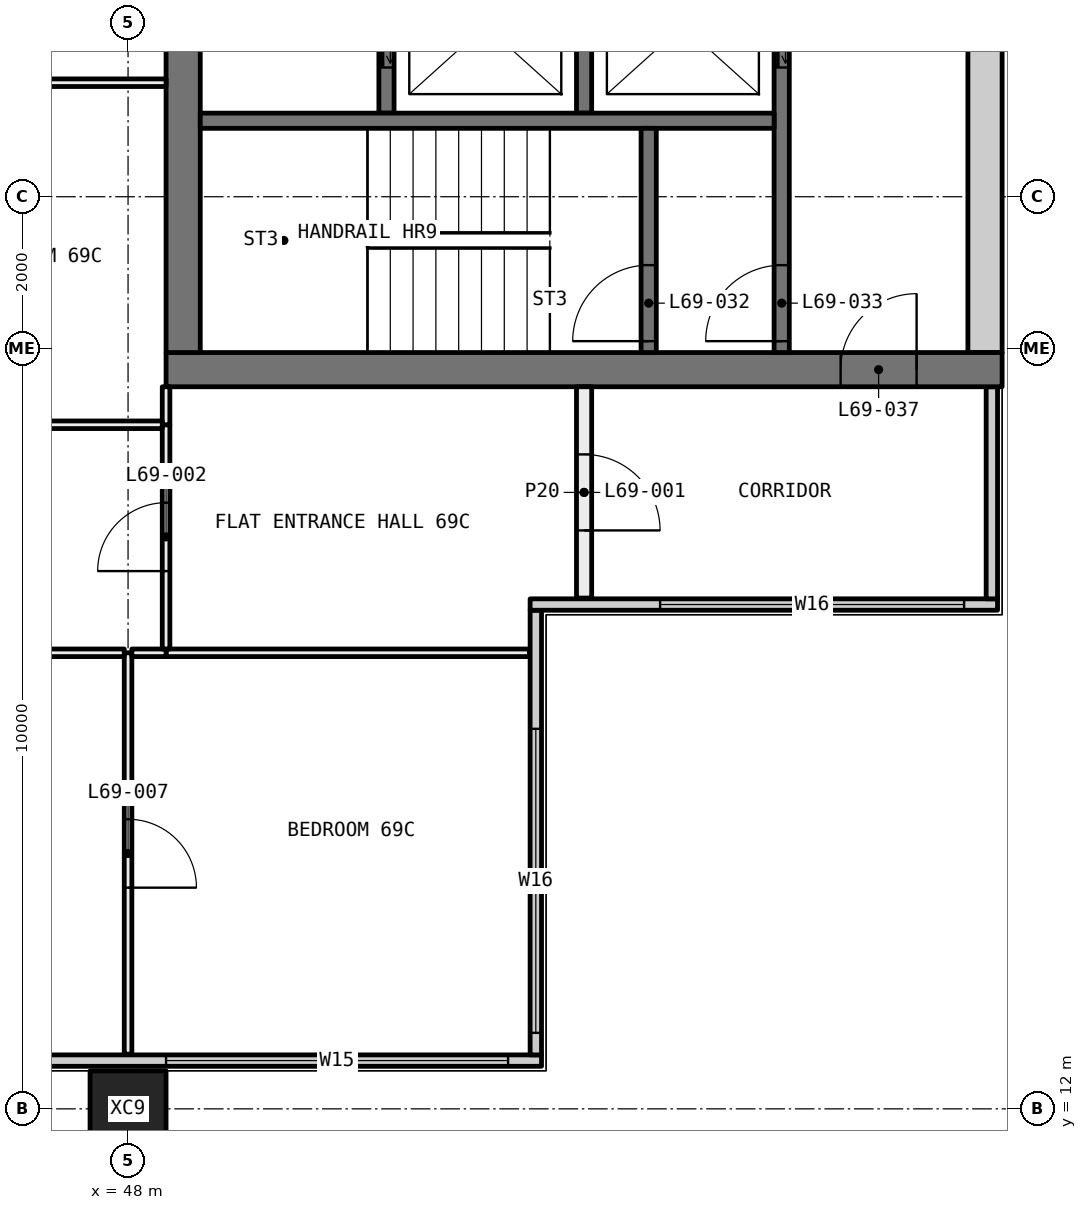
"""IFC4 building model, lengths in metres.
Left out: names, types, materials, properties, quantities, classifications, styles, units other than length and angle.
Written with IfcOpenShell. Run it as: python <this file> out.ifc"""

import sys

from ifc_helpers import new_model, si_unit, direction, frame, frame_2d, origin, origin_2d, place, context, subcontext, project, spatial, rectangle, hollow_rectangle, extrude, element, fill, save


model = new_model("IFC4")
c1 = context("Model", 3, precision=1e-05, world=origin(), true_north=direction((0.0, 1.0)))
c2 = subcontext(c1, "Body", "Model", "MODEL_VIEW")
j1 = project(units=[si_unit("LENGTHUNIT", "METRE"), si_unit("PLANEANGLEUNIT", "RADIAN")], contexts=[c1])
p1 = place(None, origin())
s1 = spatial("IfcSite", under=j1, at=p1, CompositionType="ELEMENT")
p2 = place(p1, origin())
s2 = spatial("IfcBuilding", under=s1, at=p2, CompositionType="ELEMENT")
p3 = place(p2, frame((0.0, 0.0, 255.9)))
s3 = spatial("IfcBuildingStorey", under=s2, at=p3, CompositionType="ELEMENT", Elevation=255.9)
p4 = place(p3, frame((48.0, 12.0, -0.4), z_axis=(0.0, 0.0, 1.0), x_axis=(1.0, 0.0, 0.0)))
e1 = element("IfcColumn", 1, at=p4, inside=s3, PredefinedType="COLUMN", context=c2, shape_type="SweptSolid", body=[
    extrude(hollow_rectangle(XDim=1.0, YDim=1.0, WallThickness=0.036, at=origin_2d()), origin(), (0.0, 0.0, 1.0), 3.45),
])
p5 = place(p3, frame((36.0, 12.635, 0.0), z_axis=(0.0, 0.0, 1.0), x_axis=(1.0, 0.0, 0.0)))
e2 = element("IfcWall", 2, at=p5, inside=s3, PredefinedType="ELEMENTEDWALL", context=c2, shape_type="SweptSolid", body=[
    extrude(rectangle(XDim=17.44, YDim=0.15, at=frame_2d((8.72, 0.0))), origin(), (0.0, 0.0, 1.0), 3.05),
])
p6 = place(p5, frame((1.75, 0.0, 0.45)))
e3 = element("IfcOpeningElement", 3, at=p6, cuts=e2, PredefinedType="OPENING", context=c2, shape_type="SweptSolid", body=[
    extrude(rectangle(XDim=3.75, YDim=2.55, at=frame_2d((1.875, 1.275))), frame((0.0, 0.085, 0.0), z_axis=(0.0, -1.0, 0.0), x_axis=(1.0, 0.0, 0.0)), (0.0, 0.0, 1.0), 0.17),
])
p7 = place(p5, frame((6.5, 0.0, 0.45)))
e4 = element("IfcOpeningElement", 4, at=p7, cuts=e2, PredefinedType="OPENING", context=c2, shape_type="SweptSolid", body=[
    extrude(rectangle(XDim=3.75, YDim=2.55, at=frame_2d((1.875, 1.275))), frame((0.0, 0.085, 0.0), z_axis=(0.0, -1.0, 0.0), x_axis=(1.0, 0.0, 0.0)), (0.0, 0.0, 1.0), 0.17),
])
p8 = place(p5, frame((12.5, 0.0, 0.45)))
e5 = element("IfcOpeningElement", 5, at=p8, cuts=e2, PredefinedType="OPENING", context=c2, shape_type="SweptSolid", body=[
    extrude(rectangle(XDim=4.5, YDim=2.55, at=frame_2d((2.25, 1.275))), frame((0.0, 0.085, 0.0), z_axis=(0.0, -1.0, 0.0), x_axis=(1.0, 0.0, 0.0)), (0.0, 0.0, 1.0), 0.17),
])
p9 = place(p3, frame((53.365, 12.71, 0.0), z_axis=(0.0, 0.0, 1.0), x_axis=(0.0, 1.0, 0.0)))
e6 = element("IfcWall", 6, at=p9, inside=s3, PredefinedType="ELEMENTEDWALL", context=c2, shape_type="SweptSolid", body=[
    extrude(rectangle(XDim=5.85, YDim=0.15, at=frame_2d((2.925, 0.0))), origin(), (0.0, 0.0, 1.0), 3.05),
])
p10 = place(p9, frame((0.29, 0.0, 0.45)))
e7 = element("IfcOpeningElement", 7, at=p10, cuts=e6, PredefinedType="OPENING", context=c2, shape_type="SweptSolid", body=[
    extrude(rectangle(XDim=4.0, YDim=2.55, at=frame_2d((2.0, 1.275))), frame((0.0, 0.085, 0.0), z_axis=(0.0, -1.0, 0.0), x_axis=(1.0, 0.0, 0.0)), (0.0, 0.0, 1.0), 0.17),
])
p11 = place(p3, frame((53.29, 18.635, 0.0), z_axis=(0.0, 0.0, 1.0), x_axis=(1.0, 0.0, 0.0)))
e8 = element("IfcWall", 8, at=p11, inside=s3, PredefinedType="ELEMENTEDWALL", context=c2, shape_type="SweptSolid", body=[
    extrude(rectangle(XDim=6.15, YDim=0.15, at=frame_2d((3.075, 0.0))), origin(), (0.0, 0.0, 1.0), 3.05),
])
p12 = place(p11, frame((1.71, 0.0, 0.45)))
e9 = element("IfcOpeningElement", 9, at=p12, cuts=e8, PredefinedType="OPENING", context=c2, shape_type="SweptSolid", body=[
    extrude(rectangle(XDim=4.0, YDim=2.55, at=frame_2d((2.0, 1.275))), frame((0.0, 0.085, 0.0), z_axis=(0.0, -1.0, 0.0), x_axis=(1.0, 0.0, 0.0)), (0.0, 0.0, 1.0), 0.17),
])
p13 = place(p3, frame((59.365, 18.71, 0.0), z_axis=(0.0, 0.0, 1.0), x_axis=(0.0, 1.0, 0.0)))
e10 = element("IfcWall", 10, at=p13, inside=s3, PredefinedType="ELEMENTEDWALL", context=c2, shape_type="SweptSolid", body=[
    extrude(rectangle(XDim=2.79, YDim=0.15, at=frame_2d((1.395, 0.0))), origin(), (0.0, 0.0, 1.0), 3.05),
])
p14 = place(p3, frame((48.0, 12.72, 0.0), z_axis=(0.0, 0.0, 1.0), x_axis=(0.0, 1.0, 0.0)))
e11 = element("IfcWall", 11, at=p14, inside=s3, PredefinedType="PARTITIONING", context=c2, shape_type="SweptSolid", body=[
    extrude(rectangle(XDim=5.28, YDim=0.1, at=frame_2d((2.64, 0.0))), origin(), (0.0, 0.0, 1.0), 3.05),
])
p15 = place(p14, frame((2.19, 0.0, 0.0)))
e12 = element("IfcOpeningElement", 12, at=p15, cuts=e11, PredefinedType="OPENING", context=c2, shape_type="SweptSolid", body=[
    extrude(rectangle(XDim=0.9, YDim=2.1, at=frame_2d((0.45, 1.05))), frame((0.0, 0.06, 0.0), z_axis=(0.0, -1.0, 0.0), x_axis=(1.0, 0.0, 0.0)), (0.0, 0.0, 1.0), 0.12),
])
p16 = place(p3, frame((47.95, 18.0, 0.0), z_axis=(0.0, 0.0, 1.0), x_axis=(-1.0, 0.0, 0.0)))
e13 = element("IfcWall", 13, at=p16, inside=s3, PredefinedType="PARTITIONING", context=c2, shape_type="SweptSolid", body=[
    extrude(rectangle(XDim=5.875, YDim=0.1, at=frame_2d((2.938, 0.0))), origin(), (0.0, 0.0, 1.0), 3.05),
])
p17 = place(p16, frame((2.488, 0.0, 0.0)))
e14 = element("IfcOpeningElement", 14, at=p17, cuts=e13, PredefinedType="OPENING", context=c2, shape_type="SweptSolid", body=[
    extrude(rectangle(XDim=0.9, YDim=2.1, at=frame_2d((0.45, 1.05))), frame((0.0, 0.06, 0.0), z_axis=(0.0, -1.0, 0.0), x_axis=(1.0, 0.0, 0.0)), (0.0, 0.0, 1.0), 0.12),
])
p18 = place(p3, frame((53.28, 18.0, 0.0), z_axis=(0.0, 0.0, 1.0), x_axis=(-1.0, 0.0, 0.0)))
e15 = element("IfcWall", 15, at=p18, inside=s3, PredefinedType="PARTITIONING", context=c2, shape_type="SweptSolid", body=[
    extrude(rectangle(XDim=4.78, YDim=0.1, at=frame_2d((2.39, 0.0))), origin(), (0.0, 0.0, 1.0), 3.05),
])
p19 = place(p3, frame((48.5, 18.0, 0.0), z_axis=(0.0, 0.0, 1.0), x_axis=(-1.0, 0.0, 0.0)))
e16 = element("IfcWall", 16, at=p19, inside=s3, PredefinedType="PARTITIONING", context=c2, shape_type="SweptSolid", body=[
    extrude(rectangle(XDim=0.45, YDim=0.1, at=frame_2d((0.225, 0.0))), origin(), (0.0, 0.0, 1.0), 3.05),
])
p20 = place(p3, frame((48.5, 21.0, 0.0), z_axis=(0.0, 0.0, 1.0), x_axis=(0.0, -1.0, 0.0)))
e17 = element("IfcWall", 17, at=p20, inside=s3, PredefinedType="PARTITIONING", context=c2, shape_type="SweptSolid", body=[
    extrude(rectangle(XDim=2.95, YDim=0.1, at=frame_2d((1.475, 0.0))), origin(), (0.0, 0.0, 1.0), 3.05),
])
p21 = place(p20, frame((1.025, 0.0, 0.0)))
e18 = element("IfcOpeningElement", 18, at=p21, cuts=e17, PredefinedType="OPENING", context=c2, shape_type="SweptSolid", body=[
    extrude(rectangle(XDim=0.9, YDim=2.1, at=frame_2d((0.45, 1.05))), frame((0.0, 0.06, 0.0), z_axis=(0.0, -1.0, 0.0), x_axis=(1.0, 0.0, 0.0)), (0.0, 0.0, 1.0), 0.12),
])
p22 = place(p3, frame((48.5, 21.5, 0.0), z_axis=(0.0, 0.0, 1.0), x_axis=(0.0, -1.0, 0.0)))
e19 = element("IfcWall", 19, at=p22, inside=s3, PredefinedType="PARTITIONING", context=c2, shape_type="SweptSolid", body=[
    extrude(rectangle(XDim=0.5, YDim=0.1, at=frame_2d((0.25, 0.0))), origin(), (0.0, 0.0, 1.0), 3.05),
])
p23 = place(p3, frame((54.0, 18.72, 0.0), z_axis=(0.0, 0.0, 1.0), x_axis=(0.0, 1.0, 0.0)))
e20 = element("IfcWall", 20, at=p23, inside=s3, PredefinedType="PARTITIONING", context=c2, shape_type="SweptSolid", body=[
    extrude(rectangle(XDim=2.78, YDim=0.2, at=frame_2d((1.39, 0.0))), origin(), (0.0, 0.0, 1.0), 3.05),
])
p24 = place(p23, frame((0.89, 0.0, 0.0)))
e21 = element("IfcOpeningElement", 21, at=p24, cuts=e20, PredefinedType="OPENING", context=c2, shape_type="SweptSolid", body=[
    extrude(rectangle(XDim=1.0, YDim=2.1, at=frame_2d((0.5, 1.05))), frame((0.0, 0.11, 0.0), z_axis=(0.0, -1.0, 0.0), x_axis=(1.0, 0.0, 0.0)), (0.0, 0.0, 1.0), 0.22),
])
p25 = place(p3, frame((48.45, 21.0, 0.0), z_axis=(0.0, 0.0, 1.0), x_axis=(-1.0, 0.0, 0.0)))
e22 = element("IfcWall", 22, at=p25, inside=s3, PredefinedType="PARTITIONING", context=c2, shape_type="SweptSolid", body=[
    extrude(rectangle(XDim=6.4, YDim=0.1, at=frame_2d((3.2, 0.0))), origin(), (0.0, 0.0, 1.0), 3.05),
])
p26 = place(p25, frame((2.75, 0.0, 0.0)))
e23 = element("IfcOpeningElement", 23, at=p26, cuts=e22, PredefinedType="OPENING", context=c2, shape_type="SweptSolid", body=[
    extrude(rectangle(XDim=0.9, YDim=2.1, at=frame_2d((0.45, 1.05))), frame((0.0, 0.06, 0.0), z_axis=(0.0, -1.0, 0.0), x_axis=(1.0, 0.0, 0.0)), (0.0, 0.0, 1.0), 0.12),
])
p27 = place(p3, frame((48.5, 25.5, 0.0), z_axis=(0.0, 0.0, 1.0), x_axis=(-1.0, 0.0, 0.0)))
e24 = element("IfcWall", 24, at=p27, inside=s3, PredefinedType="PARTITIONING", context=c2, shape_type="SweptSolid", body=[
    extrude(rectangle(XDim=6.45, YDim=0.1, at=frame_2d((3.225, 0.0))), origin(), (0.0, 0.0, 1.0), 3.05),
])
p28 = place(p27, frame((2.775, 0.0, 0.0)))
e25 = element("IfcOpeningElement", 25, at=p28, cuts=e24, PredefinedType="OPENING", context=c2, shape_type="SweptSolid", body=[
    extrude(rectangle(XDim=0.9, YDim=2.1, at=frame_2d((0.45, 1.05))), frame((0.0, 0.06, 0.0), z_axis=(0.0, -1.0, 0.0), x_axis=(1.0, 0.0, 0.0)), (0.0, 0.0, 1.0), 0.12),
])
p29 = place(p3, frame((59.5, 21.725, 0.0), z_axis=(0.0, 0.0, 1.0), x_axis=(-1.0, 0.0, 0.0)))
e26 = element("IfcWall", 26, at=p29, inside=s3, PredefinedType="SHEAR", context=c2, shape_type="SweptSolid", body=[
    extrude(rectangle(XDim=11.0, YDim=0.45, at=frame_2d((5.5, 0.0))), origin(), (0.0, 0.0, 1.0), 3.05),
])
p30 = place(p29, frame((1.125, 0.0, 0.0)))
e27 = element("IfcOpeningElement", 27, at=p30, cuts=e26, PredefinedType="OPENING", context=c2, shape_type="SweptSolid", body=[
    extrude(rectangle(XDim=1.0, YDim=2.1, at=frame_2d((0.5, 1.05))), frame((0.0, 0.235, 0.0), z_axis=(0.0, -1.0, 0.0), x_axis=(1.0, 0.0, 0.0)), (0.0, 0.0, 1.0), 0.47),
])
p31 = place(p3, frame((59.275, 21.95, 0.0), z_axis=(0.0, 0.0, 1.0), x_axis=(0.0, 1.0, 0.0)))
e28 = element("IfcWall", 28, at=p31, inside=s3, PredefinedType="SHEAR", context=c2, shape_type="SweptSolid", body=[
    extrude(rectangle(XDim=16.1, YDim=0.45, at=frame_2d((8.05, 0.0))), origin(), (0.0, 0.0, 1.0), 3.05),
])
p32 = place(p3, frame((48.725, 21.95, 0.0), z_axis=(0.0, 0.0, 1.0), x_axis=(0.0, 1.0, 0.0)))
e29 = element("IfcWall", 29, at=p32, inside=s3, PredefinedType="SHEAR", context=c2, shape_type="SweptSolid", body=[
    extrude(rectangle(XDim=16.1, YDim=0.45, at=frame_2d((8.05, 0.0))), origin(), (0.0, 0.0, 1.0), 3.05),
])
p33 = place(p32, frame((7.25, 0.0, 0.0)))
e30 = element("IfcOpeningElement", 30, at=p33, cuts=e29, PredefinedType="OPENING", context=c2, shape_type="SweptSolid", body=[
    extrude(rectangle(XDim=1.6, YDim=2.1, at=frame_2d((0.8, 1.05))), frame((0.0, 0.235, 0.0), z_axis=(0.0, -1.0, 0.0), x_axis=(1.0, 0.0, 0.0)), (0.0, 0.0, 1.0), 0.47),
])
p34 = place(p3, frame((56.6, 21.95, 0.0), z_axis=(0.0, 0.0, 1.0), x_axis=(0.0, 1.0, 0.0)))
e31 = element("IfcWall", 31, at=p34, inside=s3, PredefinedType="SOLIDWALL", context=c2, shape_type="SweptSolid", body=[
    extrude(rectangle(XDim=12.95, YDim=0.2, at=frame_2d((6.475, 0.0))), origin(), (0.0, 0.0, 1.0), 3.05),
])
p35 = place(p34, frame((3.75, 0.0, 0.0)))
e32 = element("IfcOpeningElement", 32, at=p35, cuts=e31, PredefinedType="OPENING", context=c2, shape_type="SweptSolid", body=[
    extrude(rectangle(XDim=1.1, YDim=2.1, at=frame_2d((0.55, 1.05))), frame((0.0, 0.11, 0.0), z_axis=(0.0, -1.0, 0.0), x_axis=(1.0, 0.0, 0.0)), (0.0, 0.0, 1.0), 0.22),
])
p36 = place(p34, frame((0.15, 0.0, 0.0)))
e33 = element("IfcOpeningElement", 33, at=p36, cuts=e31, PredefinedType="OPENING", context=c2, shape_type="SweptSolid", body=[
    extrude(rectangle(XDim=1.0, YDim=2.1, at=frame_2d((0.5, 1.05))), frame((0.0, 0.11, 0.0), z_axis=(0.0, -1.0, 0.0), x_axis=(1.0, 0.0, 0.0)), (0.0, 0.0, 1.0), 0.22),
])
p37 = place(p34, frame((6.113, 0.0, 0.0)))
e34 = element("IfcOpeningElement", 34, at=p37, cuts=e31, PredefinedType="OPENING", context=c2, shape_type="SweptSolid", body=[
    extrude(rectangle(XDim=0.9, YDim=2.1, at=frame_2d((0.45, 1.05))), frame((0.0, 0.11, 0.0), z_axis=(0.0, -1.0, 0.0), x_axis=(1.0, 0.0, 0.0)), (0.0, 0.0, 1.0), 0.22),
])
p38 = place(p34, frame((9.762, 0.0, 0.0)))
e35 = element("IfcOpeningElement", 35, at=p38, cuts=e31, PredefinedType="OPENING", context=c2, shape_type="SweptSolid", body=[
    extrude(rectangle(XDim=0.9, YDim=2.1, at=frame_2d((0.45, 1.05))), frame((0.0, 0.11, 0.0), z_axis=(0.0, -1.0, 0.0), x_axis=(1.0, 0.0, 0.0)), (0.0, 0.0, 1.0), 0.22),
])
p39 = place(p3, frame((51.4, 25.1, 0.0), z_axis=(0.0, 0.0, 1.0), x_axis=(0.0, 1.0, 0.0)))
e36 = element("IfcWall", 36, at=p39, inside=s3, PredefinedType="SOLIDWALL", context=c2, shape_type="SweptSolid", body=[
    extrude(rectangle(XDim=12.95, YDim=0.2, at=frame_2d((6.475, 0.0))), origin(), (0.0, 0.0, 1.0), 3.05),
])
p40 = place(p39, frame((0.6, 0.0, 0.0)))
e37 = element("IfcOpeningElement", 37, at=p40, cuts=e36, PredefinedType="OPENING", context=c2, shape_type="SweptSolid", body=[
    extrude(rectangle(XDim=1.1, YDim=2.1, at=frame_2d((0.55, 1.05))), frame((0.0, 0.11, 0.0), z_axis=(0.0, -1.0, 0.0), x_axis=(1.0, 0.0, 0.0)), (0.0, 0.0, 1.0), 0.22),
])
p41 = place(p39, frame((3.1, 0.0, 0.0)))
e38 = element("IfcOpeningElement", 38, at=p41, cuts=e36, PredefinedType="OPENING", context=c2, shape_type="SweptSolid", body=[
    extrude(rectangle(XDim=1.1, YDim=2.1, at=frame_2d((0.55, 1.05))), frame((0.0, 0.11, 0.0), z_axis=(0.0, -1.0, 0.0), x_axis=(1.0, 0.0, 0.0)), (0.0, 0.0, 1.0), 0.22),
])
p42 = place(p39, frame((5.6, 0.0, 0.0)))
e39 = element("IfcOpeningElement", 39, at=p42, cuts=e36, PredefinedType="OPENING", context=c2, shape_type="SweptSolid", body=[
    extrude(rectangle(XDim=1.1, YDim=2.1, at=frame_2d((0.55, 1.05))), frame((0.0, 0.11, 0.0), z_axis=(0.0, -1.0, 0.0), x_axis=(1.0, 0.0, 0.0)), (0.0, 0.0, 1.0), 0.22),
])
p43 = place(p39, frame((8.1, 0.0, 0.0)))
e40 = element("IfcOpeningElement", 40, at=p43, cuts=e36, PredefinedType="OPENING", context=c2, shape_type="SweptSolid", body=[
    extrude(rectangle(XDim=1.1, YDim=2.1, at=frame_2d((0.55, 1.05))), frame((0.0, 0.11, 0.0), z_axis=(0.0, -1.0, 0.0), x_axis=(1.0, 0.0, 0.0)), (0.0, 0.0, 1.0), 0.22),
])
p44 = place(p39, frame((10.975, 0.0, 0.0)))
e41 = element("IfcOpeningElement", 41, at=p44, cuts=e36, PredefinedType="OPENING", context=c2, shape_type="SweptSolid", body=[
    extrude(rectangle(XDim=1.0, YDim=2.1, at=frame_2d((0.5, 1.05))), frame((0.0, 0.11, 0.0), z_axis=(0.0, -1.0, 0.0), x_axis=(1.0, 0.0, 0.0)), (0.0, 0.0, 1.0), 0.22),
])
p45 = place(p3, frame((54.0, 25.1, 0.0), z_axis=(0.0, 0.0, 1.0), x_axis=(0.0, 1.0, 0.0)))
e42 = element("IfcWall", 42, at=p45, inside=s3, PredefinedType="SOLIDWALL", context=c2, shape_type="SweptSolid", body=[
    extrude(rectangle(XDim=9.8, YDim=0.2, at=frame_2d((4.9, 0.0))), origin(), (0.0, 0.0, 1.0), 3.05),
])
p46 = place(p3, frame((56.5, 25.0, 0.0), z_axis=(0.0, 0.0, 1.0), x_axis=(-1.0, 0.0, 0.0)))
e43 = element("IfcWall", 43, at=p46, inside=s3, PredefinedType="SOLIDWALL", context=c2, shape_type="SweptSolid", body=[
    extrude(rectangle(XDim=7.55, YDim=0.2, at=frame_2d((3.775, 0.0))), origin(), (0.0, 0.0, 1.0), 3.05),
])
p47 = place(p3, frame((54.85, 21.95, 0.0), z_axis=(0.0, 0.0, 1.0), x_axis=(0.0, 1.0, 0.0)))
e44 = element("IfcWall", 44, at=p47, inside=s3, PredefinedType="SOLIDWALL", context=c2, shape_type="SweptSolid", body=[
    extrude(rectangle(XDim=2.95, YDim=0.2, at=frame_2d((1.475, 0.0))), origin(), (0.0, 0.0, 1.0), 3.05),
])
p48 = place(p47, frame((0.15, 0.0, 0.0)))
e45 = element("IfcOpeningElement", 45, at=p48, cuts=e44, PredefinedType="OPENING", context=c2, shape_type="SweptSolid", body=[
    extrude(rectangle(XDim=1.0, YDim=2.1, at=frame_2d((0.5, 1.05))), frame((0.0, 0.11, 0.0), z_axis=(0.0, -1.0, 0.0), x_axis=(1.0, 0.0, 0.0)), (0.0, 0.0, 1.0), 0.22),
])
p49 = place(p8, origin())
e46 = element("IfcWindow", 46, at=p49, inside=s3, PartitioningType="SINGLE_PANEL", PredefinedType="WINDOW", context=c2, shape_type="SweptSolid", body=[
    extrude(rectangle(XDim=4.5, YDim=2.55, at=frame_2d((2.25, 1.275))), frame((0.0, 0.03, 0.0), z_axis=(0.0, -1.0, 0.0), x_axis=(1.0, 0.0, 0.0)), (0.0, 0.0, 1.0), 0.06),
])
fill(e5, e46)
p50 = place(p10, origin())
e47 = element("IfcWindow", 47, at=p50, inside=s3, PartitioningType="SINGLE_PANEL", PredefinedType="WINDOW", context=c2, shape_type="SweptSolid", body=[
    extrude(rectangle(XDim=4.0, YDim=2.55, at=frame_2d((2.0, 1.275))), frame((0.0, 0.03, 0.0), z_axis=(0.0, -1.0, 0.0), x_axis=(1.0, 0.0, 0.0)), (0.0, 0.0, 1.0), 0.06),
])
fill(e7, e47)
p51 = place(p12, origin())
e48 = element("IfcWindow", 48, at=p51, inside=s3, PartitioningType="SINGLE_PANEL", PredefinedType="WINDOW", context=c2, shape_type="SweptSolid", body=[
    extrude(rectangle(XDim=4.0, YDim=2.55, at=frame_2d((2.0, 1.275))), frame((0.0, 0.03, 0.0), z_axis=(0.0, -1.0, 0.0), x_axis=(1.0, 0.0, 0.0)), (0.0, 0.0, 1.0), 0.06),
])
fill(e9, e48)
p52 = place(p24, frame((1.0, 0.0, 0.0), x_axis=(-1.0, 0.0, 0.0)))
e49 = element("IfcDoor", 49, at=p52, inside=s3, OperationType="SINGLE_SWING_LEFT", PredefinedType="DOOR", context=c2, shape_type="SweptSolid", body=[
    extrude(rectangle(XDim=1.0, YDim=2.1, at=frame_2d((0.5, 1.05))), frame((0.0, 0.025, 0.0), z_axis=(0.0, -1.0, 0.0), x_axis=(1.0, 0.0, 0.0)), (0.0, 0.0, 1.0), 0.05),
])
fill(e21, e49)
p53 = place(p21, frame((0.9, 0.0, 0.0), x_axis=(-1.0, 0.0, 0.0)))
e50 = element("IfcDoor", 50, at=p53, inside=s3, OperationType="SINGLE_SWING_RIGHT", PredefinedType="DOOR", context=c2, shape_type="SweptSolid", body=[
    extrude(rectangle(XDim=0.9, YDim=2.1, at=frame_2d((0.45, 1.05))), frame((0.0, 0.025, 0.0), z_axis=(0.0, -1.0, 0.0), x_axis=(1.0, 0.0, 0.0)), (0.0, 0.0, 1.0), 0.05),
])
fill(e18, e50)
p54 = place(p15, frame((0.9, 0.0, 0.0), x_axis=(-1.0, 0.0, 0.0)))
e51 = element("IfcDoor", 51, at=p54, inside=s3, OperationType="SINGLE_SWING_LEFT", PredefinedType="DOOR", context=c2, shape_type="SweptSolid", body=[
    extrude(rectangle(XDim=0.9, YDim=2.1, at=frame_2d((0.45, 1.05))), frame((0.0, 0.025, 0.0), z_axis=(0.0, -1.0, 0.0), x_axis=(1.0, 0.0, 0.0)), (0.0, 0.0, 1.0), 0.05),
])
fill(e12, e51)
p55 = place(p40, origin())
e52 = element("IfcDoor", 52, at=p55, inside=s3, OperationType="SLIDING_TO_LEFT", PredefinedType="DOOR", context=c2, shape_type="SweptSolid", body=[
    extrude(rectangle(XDim=1.1, YDim=2.1, at=frame_2d((0.55, 1.05))), frame((0.0, 0.025, 0.0), z_axis=(0.0, -1.0, 0.0), x_axis=(1.0, 0.0, 0.0)), (0.0, 0.0, 1.0), 0.05),
])
fill(e37, e52)
p56 = place(p35, origin())
e53 = element("IfcDoor", 53, at=p56, inside=s3, OperationType="SLIDING_TO_LEFT", PredefinedType="DOOR", context=c2, shape_type="SweptSolid", body=[
    extrude(rectangle(XDim=1.1, YDim=2.1, at=frame_2d((0.55, 1.05))), frame((0.0, 0.025, 0.0), z_axis=(0.0, -1.0, 0.0), x_axis=(1.0, 0.0, 0.0)), (0.0, 0.0, 1.0), 0.05),
])
fill(e32, e53)
p57 = place(p48, origin())
e54 = element("IfcDoor", 54, at=p57, inside=s3, OperationType="SINGLE_SWING_RIGHT", PredefinedType="DOOR", context=c2, shape_type="SweptSolid", body=[
    extrude(rectangle(XDim=1.0, YDim=2.1, at=frame_2d((0.5, 1.05))), frame((0.0, 0.025, 0.0), z_axis=(0.0, -1.0, 0.0), x_axis=(1.0, 0.0, 0.0)), (0.0, 0.0, 1.0), 0.05),
])
fill(e45, e54)
p58 = place(p36, origin())
e55 = element("IfcDoor", 55, at=p58, inside=s3, OperationType="SINGLE_SWING_RIGHT", PredefinedType="DOOR", context=c2, shape_type="SweptSolid", body=[
    extrude(rectangle(XDim=1.0, YDim=2.1, at=frame_2d((0.5, 1.05))), frame((0.0, 0.025, 0.0), z_axis=(0.0, -1.0, 0.0), x_axis=(1.0, 0.0, 0.0)), (0.0, 0.0, 1.0), 0.05),
])
fill(e33, e55)
p59 = place(p30, frame((1.0, 0.0, 0.0), x_axis=(-1.0, 0.0, 0.0)))
e56 = element("IfcDoor", 56, at=p59, inside=s3, OperationType="SINGLE_SWING_LEFT", PredefinedType="DOOR", context=c2, shape_type="SweptSolid", body=[
    extrude(rectangle(XDim=1.0, YDim=2.1, at=frame_2d((0.5, 1.05))), frame((0.0, 0.025, 0.0), z_axis=(0.0, -1.0, 0.0), x_axis=(1.0, 0.0, 0.0)), (0.0, 0.0, 1.0), 0.05),
])
fill(e27, e56)
save(model, sys.argv[1])
